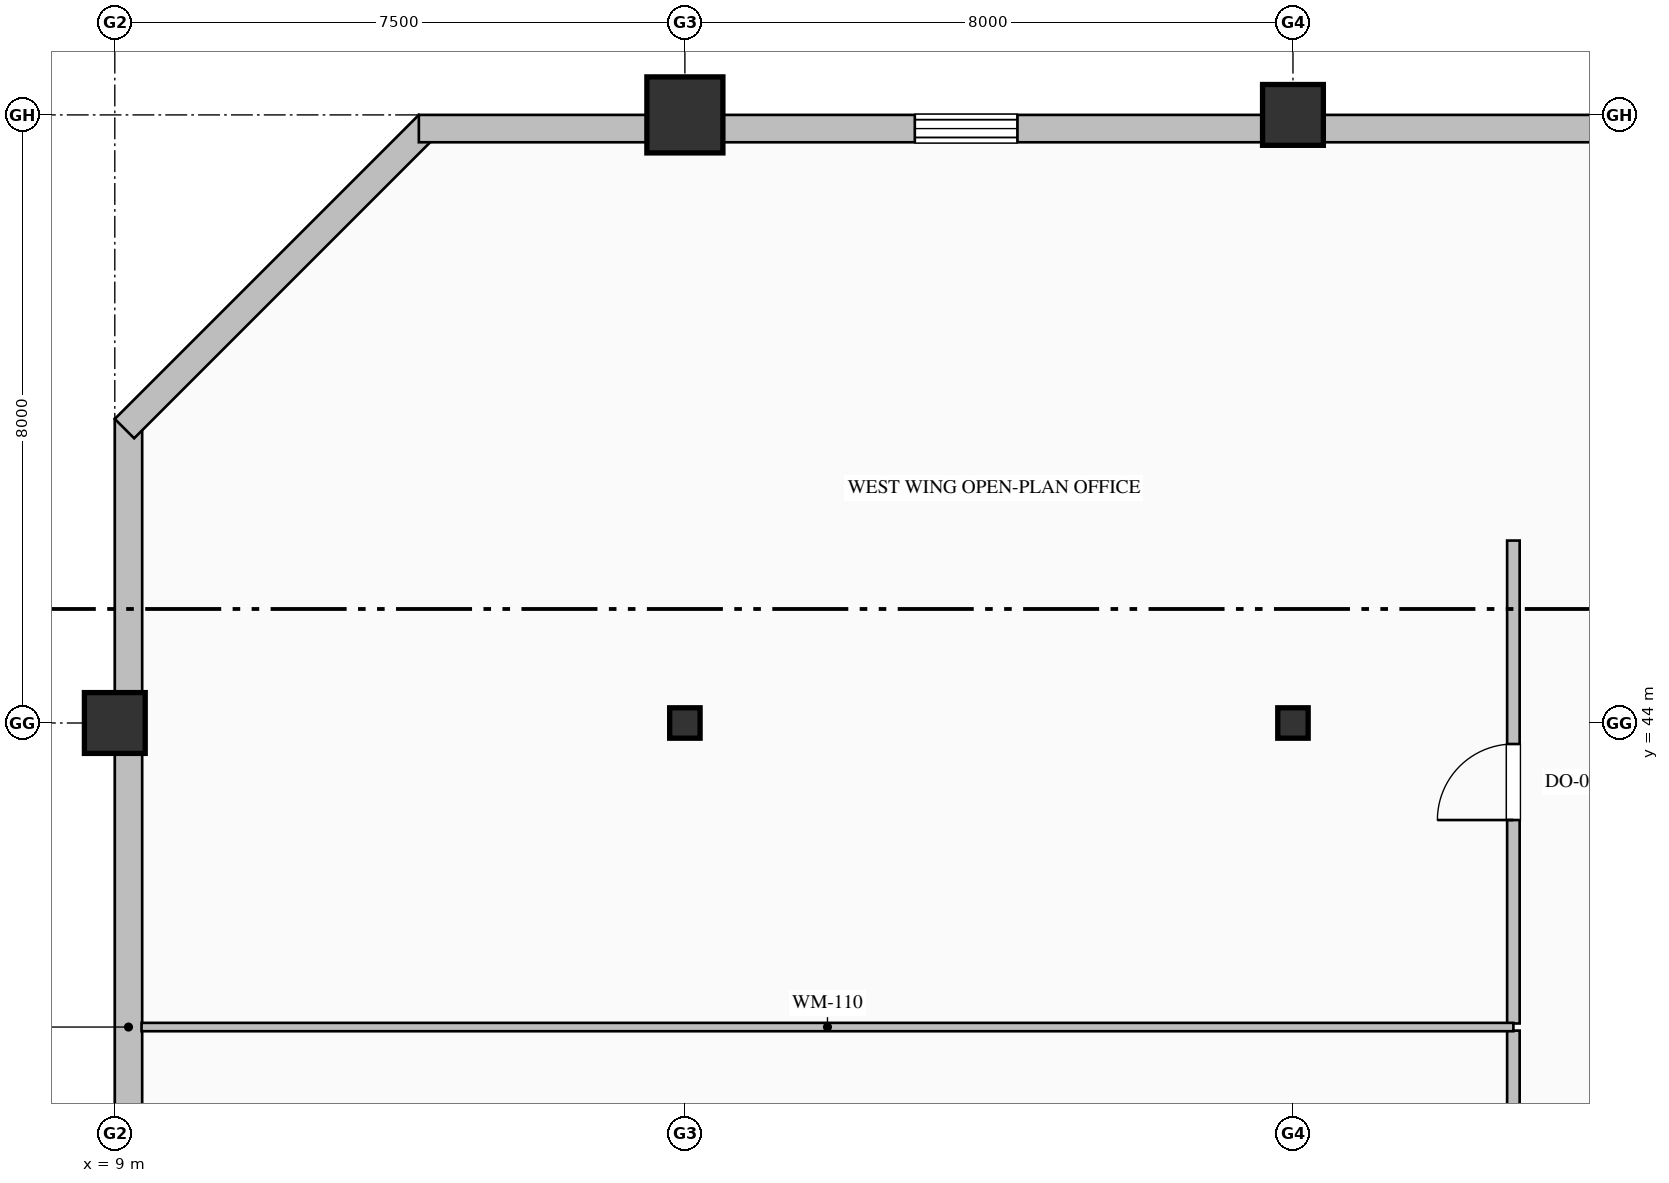
"""IFC4 building model, lengths in metres.
Left out: names, types, materials, properties, quantities, classifications, styles, units other than length and angle.
Written with IfcOpenShell. Run it as: python <this file> out.ifc"""

import sys

from ifc_helpers import new_model, si_unit, direction, frame, frame_2d, origin, origin_2d, place, context, subcontext, project, spatial, rectangle, hollow_rectangle, hollow_circle, i_section, extrude, element, fill, save


model = new_model("IFC4")
c1 = context("Model", 3, precision=1e-05, world=origin(), true_north=direction((0.0, 1.0)))
c2 = subcontext(c1, "Body", "Model", "MODEL_VIEW")
j1 = project(units=[si_unit("LENGTHUNIT", "METRE"), si_unit("PLANEANGLEUNIT", "RADIAN")], contexts=[c1])
p1 = place(None, origin())
s1 = spatial("IfcSite", under=j1, at=p1, CompositionType="ELEMENT")
p2 = place(p1, origin())
s2 = spatial("IfcBuilding", under=s1, at=p2, CompositionType="ELEMENT")
p3 = place(p2, frame((0.0, 0.0, 229.8)))
s3 = spatial("IfcBuildingStorey", under=s2, at=p3, CompositionType="ELEMENT", Elevation=229.8)
p4 = place(p3, frame((9.0, 44.0, 0.0), z_axis=(0.0, 0.0, 1.0), x_axis=(1.0, 0.0, 0.0)))
e1 = element("IfcColumn", 1, at=p4, inside=s3, PredefinedType="COLUMN", context=c2, shape_type="SweptSolid", body=[
    extrude(hollow_rectangle(XDim=0.8, YDim=0.8, WallThickness=0.032, at=origin_2d()), origin(), (0.0, 0.0, 1.0), 4.0),
])
p5 = place(p3, frame((16.5, 44.0, 0.0), z_axis=(0.0, 0.0, 1.0), x_axis=(1.0, 0.0, 0.0)))
e2 = element("IfcColumn", 2, at=p5, inside=s3, PredefinedType="COLUMN", context=c2, shape_type="SweptSolid", body=[
    extrude(i_section(OverallWidth=0.4, OverallDepth=0.4, WebThickness=0.013, FlangeThickness=0.021, FilletRadius=0.022, at=origin_2d()), origin(), (0.0, 0.0, 1.0), 4.0),
])
p6 = place(p3, frame((16.5, 52.0, 0.0), z_axis=(0.0, 0.0, 1.0), x_axis=(1.0, 0.0, 0.0)))
e3 = element("IfcColumn", 3, at=p6, inside=s3, PredefinedType="COLUMN", context=c2, shape_type="SweptSolid", body=[
    extrude(hollow_circle(Radius=0.5, WallThickness=0.036, at=origin_2d()), origin(), (0.0, 0.0, 1.0), 4.0),
])
p7 = place(p3, frame((24.5, 44.0, 0.0), z_axis=(0.0, 0.0, 1.0), x_axis=(1.0, 0.0, 0.0)))
e4 = element("IfcColumn", 4, at=p7, inside=s3, PredefinedType="COLUMN", context=c2, shape_type="SweptSolid", body=[
    extrude(i_section(OverallWidth=0.4, OverallDepth=0.4, WebThickness=0.013, FlangeThickness=0.021, FilletRadius=0.022, at=origin_2d()), origin(), (0.0, 0.0, 1.0), 4.0),
])
p8 = place(p3, frame((24.5, 52.0, 0.0), z_axis=(0.0, 0.0, 1.0), x_axis=(1.0, 0.0, 0.0)))
e5 = element("IfcColumn", 5, at=p8, inside=s3, PredefinedType="COLUMN", context=c2, shape_type="SweptSolid", body=[
    extrude(hollow_rectangle(XDim=0.8, YDim=0.8, WallThickness=0.032, at=origin_2d()), origin(), (0.0, 0.0, 1.0), 4.0),
])
p9 = place(p3, frame((9.18, 32.0, 0.0), z_axis=(0.0, 0.0, 1.0), x_axis=(0.0, 1.0, 0.0)))
e6 = element("IfcWall", 6, at=p9, inside=s3, PredefinedType="SOLIDWALL", context=c2, shape_type="SweptSolid", body=[
    extrude(rectangle(XDim=16.0, YDim=0.36, at=frame_2d((8.0, 0.0))), origin(), (0.0, 0.0, 1.0), 3.325),
])
p10 = place(p3, frame((9.127, 47.873, 0.0), z_axis=(0.0, 0.0, 1.0), x_axis=(0.707106781187, 0.707106781187, 0.0)))
e7 = element("IfcWall", 7, at=p10, inside=s3, PredefinedType="SOLIDWALL", context=c2, shape_type="SweptSolid", body=[
    extrude(rectangle(XDim=5.657, YDim=0.36, at=frame_2d((2.828, 0.0))), origin(), (0.0, 0.0, 1.0), 3.775),
])
p11 = place(p3, frame((13.0, 51.82, 0.0), z_axis=(0.0, 0.0, 1.0), x_axis=(1.0, 0.0, 0.0)))
e8 = element("IfcWall", 8, at=p11, inside=s3, PredefinedType="SOLIDWALL", context=c2, shape_type="SweptSolid", body=[
    extrude(rectangle(XDim=27.52, YDim=0.36, at=frame_2d((13.76, 0.0))), origin(), (0.0, 0.0, 1.0), 3.325),
])
p12 = place(p11, frame((6.525, 0.0, 0.9)))
e9 = element("IfcOpeningElement", 9, at=p12, cuts=e8, PredefinedType="OPENING", context=c2, shape_type="SweptSolid", body=[
    extrude(rectangle(XDim=1.35, YDim=1.85, at=frame_2d((0.675, 0.925))), frame((0.0, 0.19, 0.0), z_axis=(0.0, -1.0, 0.0), x_axis=(1.0, 0.0, 0.0)), (0.0, 0.0, 1.0), 0.38),
])
p13 = place(p3, frame((27.4, 40.047, 0.0), z_axis=(0.0, 0.0, 1.0), x_axis=(0.0, 1.0, 0.0)))
e10 = element("IfcWall", 10, at=p13, inside=s3, PredefinedType="PARTITIONING", context=c2, shape_type="SweptSolid", body=[
    extrude(rectangle(XDim=6.353, YDim=0.165, at=frame_2d((3.176, 0.0))), origin(), (0.0, 0.0, 1.0), 3.775),
])
p14 = place(p13, frame((2.677, 0.0, 0.0)))
e11 = element("IfcOpeningElement", 11, at=p14, cuts=e10, PredefinedType="OPENING", context=c2, shape_type="SweptSolid", body=[
    extrude(rectangle(XDim=1.0, YDim=2.15, at=frame_2d((0.5, 1.075))), frame((0.0, 0.093, 0.0), z_axis=(0.0, -1.0, 0.0), x_axis=(1.0, 0.0, 0.0)), (0.0, 0.0, 1.0), 0.185),
])
p15 = place(p3, frame((27.4, 32.675, 0.0), z_axis=(0.0, 0.0, 1.0), x_axis=(0.0, 1.0, 0.0)))
e12 = element("IfcWall", 12, at=p15, inside=s3, PredefinedType="PARTITIONING", context=c2, shape_type="SweptSolid", body=[
    extrude(rectangle(XDim=7.278, YDim=0.165, at=frame_2d((3.639, 0.0))), origin(), (0.0, 0.0, 1.0), 3.775),
])
p16 = place(p3, frame((27.4, 40.0, 0.0), z_axis=(0.0, 0.0, 1.0), x_axis=(-1.0, 0.0, 0.0)))
e13 = element("IfcWall", 13, at=p16, inside=s3, PredefinedType="MOVABLE", context=c2, shape_type="SweptSolid", body=[
    extrude(rectangle(XDim=18.048, YDim=0.11, at=frame_2d((9.024, 0.0))), origin(), (0.0, 0.0, 1.0), 3.467),
])
p17 = place(p12, origin())
e14 = element("IfcWindow", 14, at=p17, inside=s3, PartitioningType="DOUBLE_PANEL_VERTICAL", PredefinedType="WINDOW", context=c2, shape_type="SweptSolid", body=[
    extrude(rectangle(XDim=1.35, YDim=1.85, at=frame_2d((0.675, 0.925))), frame((0.0, 0.15, 0.0), z_axis=(0.0, -1.0, 0.0), x_axis=(1.0, 0.0, 0.0)), (0.0, 0.0, 1.0), 0.06),
])
fill(e9, e14)
p18 = place(p14, origin())
e15 = element("IfcDoor", 15, at=p18, inside=s3, OperationType="SINGLE_SWING_LEFT", PredefinedType="DOOR", context=c2, shape_type="SweptSolid", body=[
    extrude(rectangle(XDim=1.0, YDim=2.15, at=frame_2d((0.5, 1.075))), frame((0.0, 0.025, 0.0), z_axis=(0.0, -1.0, 0.0), x_axis=(1.0, 0.0, 0.0)), (0.0, 0.0, 1.0), 0.05),
])
fill(e11, e15)
save(model, sys.argv[1])
